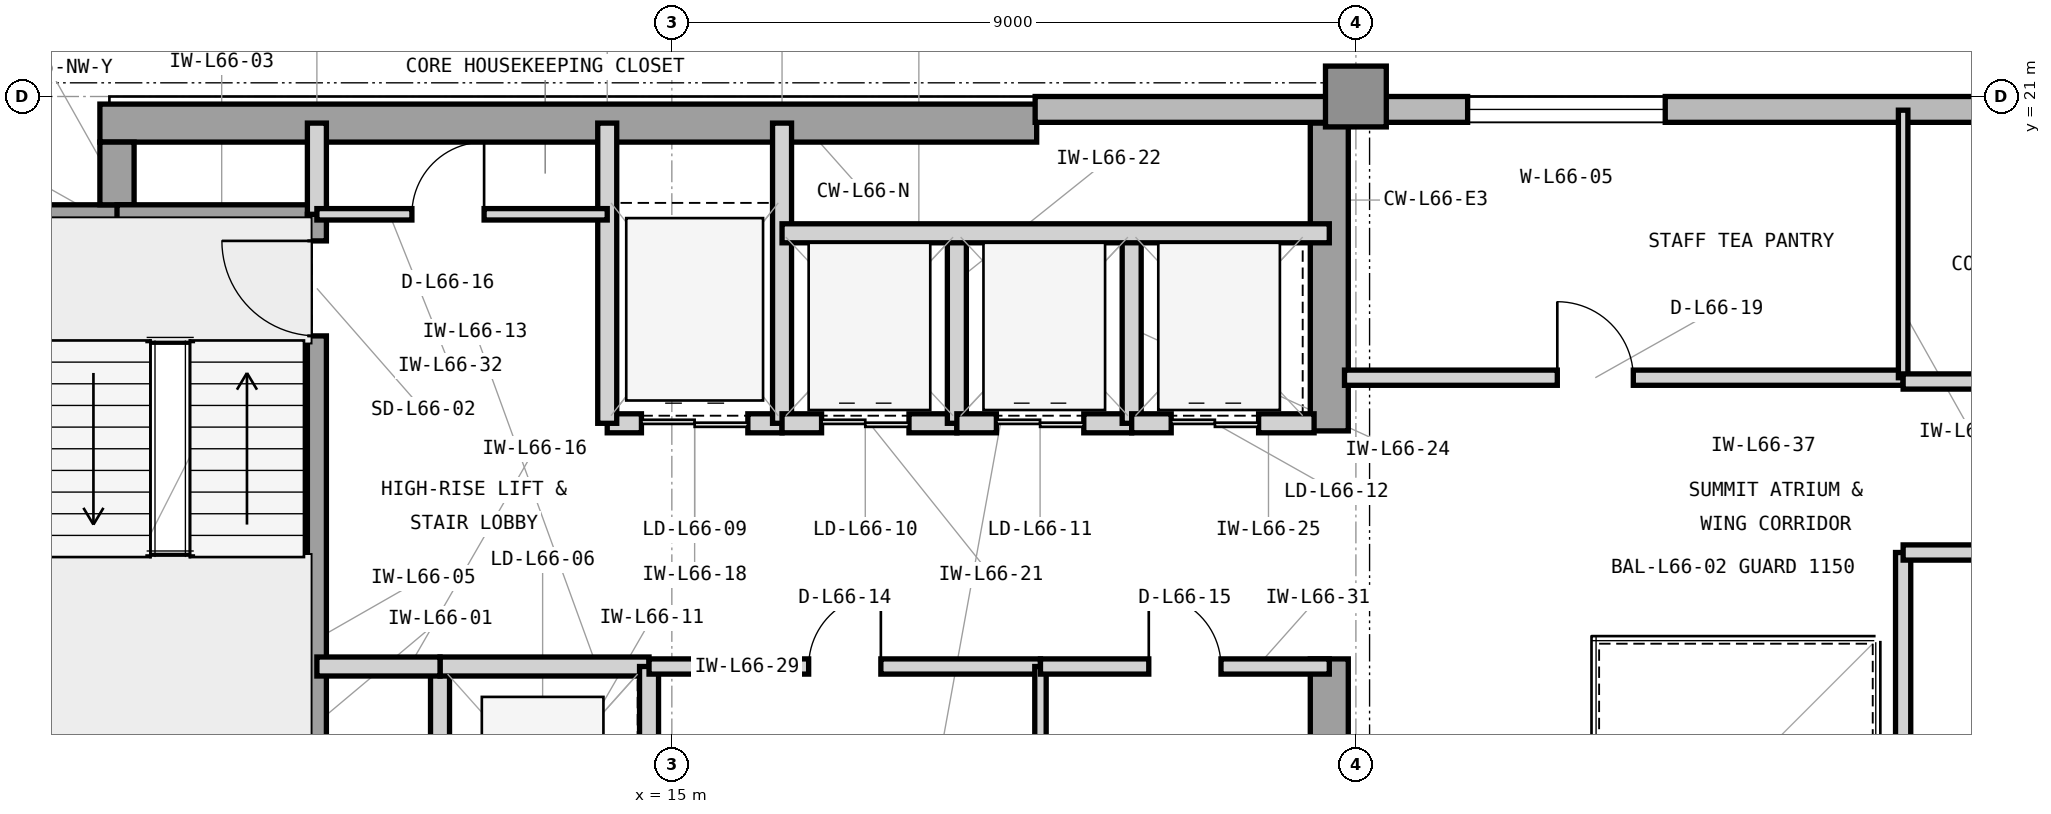
"""IFC4 building model, lengths in metres.
Left out: names, types, materials, properties, quantities, classifications, styles, units other than length and angle.
Written with IfcOpenShell. Run it as: python <this file> out.ifc"""

import sys

from ifc_helpers import new_model, si_unit, direction, frame, frame_2d, origin, origin_2d, place, context, subcontext, project, spatial, rectangle, extrude, element, fill, save


model = new_model("IFC4")
c1 = context("Model", 3, precision=1e-05, world=origin(), true_north=direction((0.0, 1.0)))
c2 = subcontext(c1, "Body", "Model", "MODEL_VIEW")
j1 = project(units=[si_unit("LENGTHUNIT", "METRE"), si_unit("PLANEANGLEUNIT", "RADIAN")], contexts=[c1])
p1 = place(None, origin())
s1 = spatial("IfcSite", under=j1, at=p1, CompositionType="ELEMENT")
p2 = place(p1, origin())
s2 = spatial("IfcBuilding", under=s1, at=p2, CompositionType="ELEMENT")
p3 = place(p2, frame((0.0, 0.0, 270.3)))
s3 = spatial("IfcBuildingStorey", under=s2, at=p3, CompositionType="ELEMENT", Elevation=270.3)
p4 = place(p3, frame((7.475, 20.65, 0.0), z_axis=(0.0, 0.0, 1.0), x_axis=(1.0, 0.0, 0.0)))
e1 = element("IfcWall", 1, at=p4, inside=s3, PredefinedType="SHEAR", context=c2, shape_type="SweptSolid", body=[
    extrude(rectangle(XDim=12.325, YDim=0.5, at=frame_2d((6.163, 0.0))), origin(), (0.0, 0.0, 1.0), 3.9),
])
p5 = place(p3, frame((23.65, 10.4, 0.0), z_axis=(0.0, 0.0, 1.0), x_axis=(0.0, 1.0, 0.0)))
e2 = element("IfcWall", 2, at=p5, inside=s3, PredefinedType="SHEAR", context=c2, shape_type="SweptSolid", body=[
    extrude(rectangle(XDim=3.2, YDim=0.5, at=frame_2d((1.6, 0.0))), origin(), (0.0, 0.0, 1.0), 3.9),
])
p6 = place(p3, frame((23.65, 16.6, 0.0), z_axis=(0.0, 0.0, 1.0), x_axis=(0.0, 1.0, 0.0)))
e3 = element("IfcWall", 3, at=p6, inside=s3, PredefinedType="SHEAR", context=c2, shape_type="SweptSolid", body=[
    extrude(rectangle(XDim=4.05, YDim=0.5, at=frame_2d((2.025, 0.0))), origin(), (0.0, 0.0, 1.0), 3.9),
])
p7 = place(p3, frame((6.6, 19.35, 0.0), z_axis=(0.0, 0.0, 1.0), x_axis=(1.0, 0.0, 0.0)))
e4 = element("IfcWall", 4, at=p7, inside=s3, PredefinedType="SHEAR", context=c2, shape_type="SweptSolid", body=[
    extrude(rectangle(XDim=1.325, YDim=0.45, at=frame_2d((0.663, 0.0))), origin(), (0.0, 0.0, 1.0), 3.9),
])
p8 = place(p3, frame((7.7, 19.575, 0.0), z_axis=(0.0, 0.0, 1.0), x_axis=(0.0, 1.0, 0.0)))
e5 = element("IfcWall", 5, at=p8, inside=s3, PredefinedType="SHEAR", context=c2, shape_type="SweptSolid", body=[
    extrude(rectangle(XDim=0.825, YDim=0.45, at=frame_2d((0.413, 0.0))), origin(), (0.0, 0.0, 1.0), 3.9),
])
p9 = place(p3, frame((24.0, 21.0, 0.0), z_axis=(0.0, 0.0, 1.0), x_axis=(1.0, 0.0, 0.0)))
e6 = element("IfcColumn", 6, at=p9, inside=s3, PredefinedType="COLUMN", context=c2, shape_type="SweptSolid", body=[
    extrude(rectangle(XDim=0.8, YDim=0.8, at=origin_2d()), origin(), (0.0, 0.0, 1.0), 3.9),
])
p10 = place(p3, frame((52.4, 20.83, 0.0), z_axis=(0.0, 0.0, 1.0), x_axis=(-1.0, 0.0, 0.0)))
e7 = element("IfcWall", 7, at=p10, inside=s3, PredefinedType="STANDARD", context=c2, shape_type="SweptSolid", body=[
    extrude(rectangle(XDim=32.62, YDim=0.34, at=frame_2d((16.31, 0.0))), origin(), (0.0, 0.0, 1.0), 3.715),
])
p11 = place(p10, frame((15.01, 0.0, 0.8)))
e8 = element("IfcOpeningElement", 8, at=p11, cuts=e7, PredefinedType="OPENING", context=c2, shape_type="SweptSolid", body=[
    extrude(rectangle(XDim=2.6, YDim=2.35, at=frame_2d((1.3, 1.175))), frame((0.0, 0.18, 0.0), z_axis=(0.0, -1.0, 0.0), x_axis=(1.0, 0.0, 0.0)), (0.0, 0.0, 1.0), 0.36),
])
p12 = place(p10, frame((24.33, 0.0, 0.8)))
e9 = element("IfcOpeningElement", 9, at=p12, cuts=e7, PredefinedType="OPENING", context=c2, shape_type="SweptSolid", body=[
    extrude(rectangle(XDim=2.6, YDim=2.35, at=frame_2d((1.3, 1.175))), frame((0.0, 0.18, 0.0), z_axis=(0.0, -1.0, 0.0), x_axis=(1.0, 0.0, 0.0)), (0.0, 0.0, 1.0), 0.36),
])
p13 = place(p10, frame((7.525, 0.0, 0.8)))
e10 = element("IfcOpeningElement", 10, at=p13, cuts=e7, PredefinedType="OPENING", context=c2, shape_type="SweptSolid", body=[
    extrude(rectangle(XDim=1.9, YDim=2.35, at=frame_2d((0.95, 1.175))), frame((0.0, 0.18, 0.0), z_axis=(0.0, -1.0, 0.0), x_axis=(1.0, 0.0, 0.0)), (0.0, 0.0, 1.0), 0.36),
])
p14 = place(p3, frame((7.7, 19.45, 0.0), z_axis=(0.0, 0.0, 1.0), x_axis=(1.0, 0.0, 0.0)))
e11 = element("IfcWall", 11, at=p14, inside=s3, PredefinedType="SHEAR", context=c2, shape_type="SweptSolid", body=[
    extrude(rectangle(XDim=2.755, YDim=0.25, at=frame_2d((1.377, 0.0))), origin(), (0.0, 0.0, 1.0), 3.9),
])
p15 = place(p3, frame((10.33, 12.0, 0.0), z_axis=(0.0, 0.0, 1.0), x_axis=(0.0, 1.0, 0.0)))
e12 = element("IfcWall", 12, at=p15, inside=s3, PredefinedType="SHEAR", context=c2, shape_type="SweptSolid", body=[
    extrude(rectangle(XDim=7.45, YDim=0.25, at=frame_2d((3.725, 0.0))), origin(), (0.0, 0.0, 1.0), 3.9),
])
p16 = place(p15, frame((5.85, 0.0, 0.0)))
e13 = element("IfcOpeningElement", 13, at=p16, cuts=e12, PredefinedType="OPENING", context=c2, shape_type="SweptSolid", body=[
    extrude(rectangle(XDim=1.25, YDim=2.2, at=frame_2d((0.625, 1.1))), frame((0.0, 0.135, 0.0), z_axis=(0.0, -1.0, 0.0), x_axis=(1.0, 0.0, 0.0)), (0.0, 0.0, 1.0), 0.27),
])
p17 = place(p3, frame((10.33, 19.45, 0.0), z_axis=(0.0, 0.0, 1.0), x_axis=(0.0, 1.0, 0.0)))
e14 = element("IfcWall", 14, at=p17, inside=s3, PredefinedType="PARTITIONING", context=c2, shape_type="SweptSolid", body=[
    extrude(rectangle(XDim=1.2, YDim=0.25, at=frame_2d((0.6, 0.0))), origin(), (0.0, 0.0, 1.0), 3.705),
])
p18 = place(p3, frame((11.95, 10.5, 0.0), z_axis=(0.0, 0.0, 1.0), x_axis=(0.0, 1.0, 0.0)))
e15 = element("IfcWall", 15, at=p18, inside=s3, PredefinedType="PARTITIONING", context=c2, shape_type="SweptSolid", body=[
    extrude(rectangle(XDim=3.0, YDim=0.25, at=frame_2d((1.5, 0.0))), origin(), (0.0, 0.0, 1.0), 3.705),
])
p19 = place(p3, frame((11.95, 13.5, 0.0), z_axis=(0.0, 0.0, 1.0), x_axis=(1.0, 0.0, 0.0)))
e16 = element("IfcWall", 16, at=p19, inside=s3, PredefinedType="PARTITIONING", context=c2, shape_type="SweptSolid", body=[
    extrude(rectangle(XDim=2.75, YDim=0.25, at=frame_2d((1.375, 0.0))), origin(), (0.0, 0.0, 1.0), 3.088),
])
p20 = place(p3, frame((14.7, 10.5, 0.0), z_axis=(0.0, 0.0, 1.0), x_axis=(0.0, 1.0, 0.0)))
e17 = element("IfcWall", 17, at=p20, inside=s3, PredefinedType="PARTITIONING", context=c2, shape_type="SweptSolid", body=[
    extrude(rectangle(XDim=3.0, YDim=0.25, at=frame_2d((1.5, 0.0))), origin(), (0.0, 0.0, 1.0), 3.705),
])
p21 = place(p3, frame((10.33, 13.5, 0.0), z_axis=(0.0, 0.0, 1.0), x_axis=(1.0, 0.0, 0.0)))
e18 = element("IfcWall", 18, at=p21, inside=s3, PredefinedType="PARTITIONING", context=c2, shape_type="SweptSolid", body=[
    extrude(rectangle(XDim=1.62, YDim=0.25, at=frame_2d((0.81, 0.0))), origin(), (0.0, 0.0, 1.0), 3.088),
])
p22 = place(p3, frame((14.15, 16.7, 0.0), z_axis=(0.0, 0.0, 1.0), x_axis=(1.0, 0.0, 0.0)))
e19 = element("IfcWall", 19, at=p22, inside=s3, PredefinedType="PARTITIONING", context=c2, shape_type="SweptSolid", body=[
    extrude(rectangle(XDim=2.3, YDim=0.25, at=frame_2d((1.15, 0.0))), origin(), (0.0, 0.0, 1.0), 3.088),
])
p23 = place(p22, frame((0.45, 0.0, 0.0)))
e20 = element("IfcOpeningElement", 20, at=p23, cuts=e19, PredefinedType="OPENING", context=c2, shape_type="SweptSolid", body=[
    extrude(rectangle(XDim=1.4, YDim=2.35, at=frame_2d((0.7, 1.175))), frame((0.0, 0.135, 0.0), z_axis=(0.0, -1.0, 0.0), x_axis=(1.0, 0.0, 0.0)), (0.0, 0.0, 1.0), 0.27),
])
for number, where, z_axis, x_axis in (
    (21, (14.15, 16.7, 0.0), (0.0, 0.0, 1.0), (0.0, 1.0, 0.0)),
    (22, (16.45, 16.7, 0.0), (0.0, 0.0, 1.0), (0.0, 1.0, 0.0)),
):
    element("IfcWall", number, at=place(p3, frame(where, z_axis=z_axis, x_axis=x_axis)), inside=s3, PredefinedType="PARTITIONING", context=c2, shape_type="SweptSolid", body=[
        extrude(rectangle(XDim=3.95, YDim=0.25, at=frame_2d((1.975, 0.0))), origin(), (0.0, 0.0, 1.0), 3.705),
    ])
p24 = place(p3, frame((16.45, 16.7, 0.0), z_axis=(0.0, 0.0, 1.0), x_axis=(1.0, 0.0, 0.0)))
e23 = element("IfcWall", 23, at=p24, inside=s3, PredefinedType="PARTITIONING", context=c2, shape_type="SweptSolid", body=[
    extrude(rectangle(XDim=2.3, YDim=0.25, at=frame_2d((1.15, 0.0))), origin(), (0.0, 0.0, 1.0), 3.088),
])
p25 = place(p24, frame((0.52, 0.0, 0.0)))
e24 = element("IfcOpeningElement", 24, at=p25, cuts=e23, PredefinedType="OPENING", context=c2, shape_type="SweptSolid", body=[
    extrude(rectangle(XDim=1.15, YDim=2.25, at=frame_2d((0.575, 1.125))), frame((0.0, 0.135, 0.0), z_axis=(0.0, -1.0, 0.0), x_axis=(1.0, 0.0, 0.0)), (0.0, 0.0, 1.0), 0.27),
])
p26 = place(p3, frame((18.75, 16.7, 0.0), z_axis=(0.0, 0.0, 1.0), x_axis=(0.0, 1.0, 0.0)))
e25 = element("IfcWall", 25, at=p26, inside=s3, PredefinedType="PARTITIONING", context=c2, shape_type="SweptSolid", body=[
    extrude(rectangle(XDim=2.5, YDim=0.25, at=frame_2d((1.25, 0.0))), origin(), (0.0, 0.0, 1.0), 3.705),
])
p27 = place(p3, frame((18.75, 16.7, 0.0), z_axis=(0.0, 0.0, 1.0), x_axis=(1.0, 0.0, 0.0)))
e26 = element("IfcWall", 26, at=p27, inside=s3, PredefinedType="PARTITIONING", context=c2, shape_type="SweptSolid", body=[
    extrude(rectangle(XDim=2.3, YDim=0.25, at=frame_2d((1.15, 0.0))), origin(), (0.0, 0.0, 1.0), 3.088),
])
p28 = place(p27, frame((0.52, 0.0, 0.0)))
e27 = element("IfcOpeningElement", 27, at=p28, cuts=e26, PredefinedType="OPENING", context=c2, shape_type="SweptSolid", body=[
    extrude(rectangle(XDim=1.15, YDim=2.25, at=frame_2d((0.575, 1.125))), frame((0.0, 0.135, 0.0), z_axis=(0.0, -1.0, 0.0), x_axis=(1.0, 0.0, 0.0)), (0.0, 0.0, 1.0), 0.27),
])
p29 = place(p3, frame((21.05, 16.7, 0.0), z_axis=(0.0, 0.0, 1.0), x_axis=(0.0, 1.0, 0.0)))
e28 = element("IfcWall", 28, at=p29, inside=s3, PredefinedType="PARTITIONING", context=c2, shape_type="SweptSolid", body=[
    extrude(rectangle(XDim=2.5, YDim=0.25, at=frame_2d((1.25, 0.0))), origin(), (0.0, 0.0, 1.0), 3.705),
])
p30 = place(p3, frame((21.05, 16.7, 0.0), z_axis=(0.0, 0.0, 1.0), x_axis=(1.0, 0.0, 0.0)))
e29 = element("IfcWall", 29, at=p30, inside=s3, PredefinedType="PARTITIONING", context=c2, shape_type="SweptSolid", body=[
    extrude(rectangle(XDim=2.4, YDim=0.25, at=frame_2d((1.2, 0.0))), origin(), (0.0, 0.0, 1.0), 3.088),
])
p31 = place(p30, frame((0.52, 0.0, 0.0)))
e30 = element("IfcOpeningElement", 30, at=p31, cuts=e29, PredefinedType="OPENING", context=c2, shape_type="SweptSolid", body=[
    extrude(rectangle(XDim=1.15, YDim=2.25, at=frame_2d((0.575, 1.125))), frame((0.0, 0.135, 0.0), z_axis=(0.0, -1.0, 0.0), x_axis=(1.0, 0.0, 0.0)), (0.0, 0.0, 1.0), 0.27),
])
p32 = place(p3, frame((16.45, 19.2, 0.0), z_axis=(0.0, 0.0, 1.0), x_axis=(1.0, 0.0, 0.0)))
e31 = element("IfcWall", 31, at=p32, inside=s3, PredefinedType="PARTITIONING", context=c2, shape_type="SweptSolid", body=[
    extrude(rectangle(XDim=7.2, YDim=0.25, at=frame_2d((3.6, 0.0))), origin(), (0.0, 0.0, 1.0), 3.705),
])
p33 = place(p3, frame((14.7, 13.5, 0.0), z_axis=(0.0, 0.0, 1.0), x_axis=(1.0, 0.0, 0.0)))
e32 = element("IfcWall", 32, at=p33, inside=s3, PredefinedType="PARTITIONING", context=c2, shape_type="SweptSolid", body=[
    extrude(rectangle(XDim=5.15, YDim=0.2, at=frame_2d((2.575, 0.0))), origin(), (0.0, 0.0, 1.0), 3.088),
])
p34 = place(p33, frame((2.1, 0.0, 0.0)))
e33 = element("IfcOpeningElement", 33, at=p34, cuts=e32, PredefinedType="OPENING", context=c2, shape_type="SweptSolid", body=[
    extrude(rectangle(XDim=0.95, YDim=2.1, at=frame_2d((0.475, 1.05))), frame((0.0, 0.11, 0.0), z_axis=(0.0, -1.0, 0.0), x_axis=(1.0, 0.0, 0.0)), (0.0, 0.0, 1.0), 0.22),
])
p35 = place(p3, frame((19.85, 10.465, 0.0), z_axis=(0.0, 0.0, 1.0), x_axis=(0.0, 1.0, 0.0)))
e34 = element("IfcWall", 34, at=p35, inside=s3, PredefinedType="PARTITIONING", context=c2, shape_type="SweptSolid", body=[
    extrude(rectangle(XDim=3.035, YDim=0.15, at=frame_2d((1.518, 0.0))), origin(), (0.0, 0.0, 1.0), 3.705),
])
p36 = place(p3, frame((19.85, 13.5, 0.0), z_axis=(0.0, 0.0, 1.0), x_axis=(1.0, 0.0, 0.0)))
e35 = element("IfcWall", 35, at=p36, inside=s3, PredefinedType="PARTITIONING", context=c2, shape_type="SweptSolid", body=[
    extrude(rectangle(XDim=3.8, YDim=0.2, at=frame_2d((1.9, 0.0))), origin(), (0.0, 0.0, 1.0), 3.088),
])
p37 = place(p36, frame((1.425, 0.0, 0.0)))
e36 = element("IfcOpeningElement", 36, at=p37, cuts=e35, PredefinedType="OPENING", context=c2, shape_type="SweptSolid", body=[
    extrude(rectangle(XDim=0.95, YDim=2.1, at=frame_2d((0.475, 1.05))), frame((0.0, 0.11, 0.0), z_axis=(0.0, -1.0, 0.0), x_axis=(1.0, 0.0, 0.0)), (0.0, 0.0, 1.0), 0.22),
])
p38 = place(p3, frame((10.33, 19.45, 0.0), z_axis=(0.0, 0.0, 1.0), x_axis=(1.0, 0.0, 0.0)))
e37 = element("IfcWall", 37, at=p38, inside=s3, PredefinedType="PARTITIONING", context=c2, shape_type="SweptSolid", body=[
    extrude(rectangle(XDim=3.82, YDim=0.15, at=frame_2d((1.91, 0.0))), origin(), (0.0, 0.0, 1.0), 3.705),
])
p39 = place(p38, frame((1.25, 0.0, 0.0)))
e38 = element("IfcOpeningElement", 38, at=p39, cuts=e37, PredefinedType="OPENING", context=c2, shape_type="SweptSolid", body=[
    extrude(rectangle(XDim=0.95, YDim=2.1, at=frame_2d((0.475, 1.05))), frame((0.0, 0.085, 0.0), z_axis=(0.0, -1.0, 0.0), x_axis=(1.0, 0.0, 0.0)), (0.0, 0.0, 1.0), 0.17),
])
p40 = place(p3, frame((31.2, 3.18, 0.0), z_axis=(0.0, 0.0, 1.0), x_axis=(0.0, 1.0, 0.0)))
e39 = element("IfcWall", 39, at=p40, inside=s3, PredefinedType="PARTITIONING", context=c2, shape_type="SweptSolid", body=[
    extrude(rectangle(XDim=11.82, YDim=0.2, at=frame_2d((5.91, 0.0))), origin(), (0.0, 0.0, 1.0), 3.705),
])
p41 = place(p3, frame((23.85, 17.3, 0.0), z_axis=(0.0, 0.0, 1.0), x_axis=(1.0, 0.0, 0.0)))
e40 = element("IfcWall", 40, at=p41, inside=s3, PredefinedType="PARTITIONING", context=c2, shape_type="SweptSolid", body=[
    extrude(rectangle(XDim=7.35, YDim=0.2, at=frame_2d((3.675, 0.0))), origin(), (0.0, 0.0, 1.0), 3.705),
])
p42 = place(p41, frame((2.8, 0.0, 0.0)))
e41 = element("IfcOpeningElement", 41, at=p42, cuts=e40, PredefinedType="OPENING", context=c2, shape_type="SweptSolid", body=[
    extrude(rectangle(XDim=1.0, YDim=2.15, at=frame_2d((0.5, 1.075))), frame((0.0, 0.11, 0.0), z_axis=(0.0, -1.0, 0.0), x_axis=(1.0, 0.0, 0.0)), (0.0, 0.0, 1.0), 0.22),
])
p43 = place(p3, frame((31.2, 17.3, 0.0), z_axis=(0.0, 0.0, 1.0), x_axis=(0.0, 1.0, 0.0)))
e42 = element("IfcWall", 42, at=p43, inside=s3, PredefinedType="PARTITIONING", context=c2, shape_type="SweptSolid", body=[
    extrude(rectangle(XDim=3.52, YDim=0.125, at=frame_2d((1.76, 0.0))), origin(), (0.0, 0.0, 1.0), 3.705),
])
p44 = place(p3, frame((31.2, 15.0, 0.0), z_axis=(0.0, 0.0, 1.0), x_axis=(1.0, 0.0, 0.0)))
e43 = element("IfcWall", 43, at=p44, inside=s3, PredefinedType="PARTITIONING", context=c2, shape_type="SweptSolid", body=[
    extrude(rectangle(XDim=6.5, YDim=0.2, at=frame_2d((3.25, 0.0))), origin(), (0.0, 0.0, 1.0), 3.301),
])
p45 = place(p44, frame((2.5, 0.0, 0.0)))
e44 = element("IfcOpeningElement", 44, at=p45, cuts=e43, PredefinedType="OPENING", context=c2, shape_type="SweptSolid", body=[
    extrude(rectangle(XDim=1.5, YDim=2.3, at=frame_2d((0.75, 1.15))), frame((0.0, 0.11, 0.0), z_axis=(0.0, -1.0, 0.0), x_axis=(1.0, 0.0, 0.0)), (0.0, 0.0, 1.0), 0.22),
])
p46 = place(p3, frame((31.2, 17.25, 0.0), z_axis=(0.0, 0.0, 1.0), x_axis=(1.0, 0.0, 0.0)))
e45 = element("IfcWall", 45, at=p46, inside=s3, PredefinedType="PARTITIONING", context=c2, shape_type="SweptSolid", body=[
    extrude(rectangle(XDim=9.0, YDim=0.2, at=frame_2d((4.5, 0.0))), origin(), (0.0, 0.0, 1.0), 3.705),
])
p47 = place(p46, frame((3.75, 0.0, 0.0)))
e46 = element("IfcOpeningElement", 46, at=p47, cuts=e45, PredefinedType="OPENING", context=c2, shape_type="SweptSolid", body=[
    extrude(rectangle(XDim=1.5, YDim=2.3, at=frame_2d((0.75, 1.15))), frame((0.0, 0.11, 0.0), z_axis=(0.0, -1.0, 0.0), x_axis=(1.0, 0.0, 0.0)), (0.0, 0.0, 1.0), 0.22),
])
p48 = place(p12, origin())
e47 = element("IfcWindow", 47, at=p48, inside=s3, PartitioningType="SINGLE_PANEL", PredefinedType="WINDOW", context=c2, shape_type="SweptSolid", body=[
    extrude(rectangle(XDim=2.6, YDim=2.35, at=frame_2d((1.3, 1.175))), frame((0.0, 0.11, 0.0), z_axis=(0.0, -1.0, 0.0), x_axis=(1.0, 0.0, 0.0)), (0.0, 0.0, 1.0), 0.06),
])
fill(e9, e47)
p49 = place(p16, origin())
e48 = element("IfcDoor", 48, at=p49, inside=s3, OperationType="SINGLE_SWING_RIGHT", PredefinedType="DOOR", context=c2, shape_type="SweptSolid", body=[
    extrude(rectangle(XDim=1.25, YDim=2.2, at=frame_2d((0.625, 1.1))), frame((0.0, 0.025, 0.0), z_axis=(0.0, -1.0, 0.0), x_axis=(1.0, 0.0, 0.0)), (0.0, 0.0, 1.0), 0.05),
])
fill(e13, e48)
p50 = place(p23, origin())
e49 = element("IfcDoor", 49, at=p50, inside=s3, OperationType="DOUBLE_DOOR_SLIDING", PredefinedType="DOOR", context=c2, shape_type="SweptSolid", body=[
    extrude(rectangle(XDim=1.4, YDim=2.35, at=frame_2d((0.7, 1.175))), frame((0.0, 0.025, 0.0), z_axis=(0.0, -1.0, 0.0), x_axis=(1.0, 0.0, 0.0)), (0.0, 0.0, 1.0), 0.05),
])
fill(e20, e49)
p51 = place(p25, origin())
e50 = element("IfcDoor", 50, at=p51, inside=s3, OperationType="DOUBLE_DOOR_SLIDING", PredefinedType="DOOR", context=c2, shape_type="SweptSolid", body=[
    extrude(rectangle(XDim=1.15, YDim=2.25, at=frame_2d((0.575, 1.125))), frame((0.0, 0.025, 0.0), z_axis=(0.0, -1.0, 0.0), x_axis=(1.0, 0.0, 0.0)), (0.0, 0.0, 1.0), 0.05),
])
fill(e24, e50)
p52 = place(p28, origin())
e51 = element("IfcDoor", 51, at=p52, inside=s3, OperationType="DOUBLE_DOOR_SLIDING", PredefinedType="DOOR", context=c2, shape_type="SweptSolid", body=[
    extrude(rectangle(XDim=1.15, YDim=2.25, at=frame_2d((0.575, 1.125))), frame((0.0, 0.025, 0.0), z_axis=(0.0, -1.0, 0.0), x_axis=(1.0, 0.0, 0.0)), (0.0, 0.0, 1.0), 0.05),
])
fill(e27, e51)
p53 = place(p31, origin())
e52 = element("IfcDoor", 52, at=p53, inside=s3, OperationType="DOUBLE_DOOR_SLIDING", PredefinedType="DOOR", context=c2, shape_type="SweptSolid", body=[
    extrude(rectangle(XDim=1.15, YDim=2.25, at=frame_2d((0.575, 1.125))), frame((0.0, 0.025, 0.0), z_axis=(0.0, -1.0, 0.0), x_axis=(1.0, 0.0, 0.0)), (0.0, 0.0, 1.0), 0.05),
])
fill(e30, e52)
p54 = place(p34, origin())
e53 = element("IfcDoor", 53, at=p54, inside=s3, OperationType="SINGLE_SWING_RIGHT", PredefinedType="DOOR", context=c2, shape_type="SweptSolid", body=[
    extrude(rectangle(XDim=0.95, YDim=2.1, at=frame_2d((0.475, 1.05))), frame((0.0, 0.025, 0.0), z_axis=(0.0, -1.0, 0.0), x_axis=(1.0, 0.0, 0.0)), (0.0, 0.0, 1.0), 0.05),
])
fill(e33, e53)
p55 = place(p37, origin())
e54 = element("IfcDoor", 54, at=p55, inside=s3, OperationType="SINGLE_SWING_LEFT", PredefinedType="DOOR", context=c2, shape_type="SweptSolid", body=[
    extrude(rectangle(XDim=0.95, YDim=2.1, at=frame_2d((0.475, 1.05))), frame((0.0, 0.025, 0.0), z_axis=(0.0, -1.0, 0.0), x_axis=(1.0, 0.0, 0.0)), (0.0, 0.0, 1.0), 0.05),
])
fill(e36, e54)
p56 = place(p39, origin())
e55 = element("IfcDoor", 55, at=p56, inside=s3, OperationType="SINGLE_SWING_RIGHT", PredefinedType="DOOR", context=c2, shape_type="SweptSolid", body=[
    extrude(rectangle(XDim=0.95, YDim=2.1, at=frame_2d((0.475, 1.05))), frame((0.0, 0.025, 0.0), z_axis=(0.0, -1.0, 0.0), x_axis=(1.0, 0.0, 0.0)), (0.0, 0.0, 1.0), 0.05),
])
fill(e38, e55)
p57 = place(p42, origin())
e56 = element("IfcDoor", 56, at=p57, inside=s3, OperationType="SINGLE_SWING_LEFT", PredefinedType="DOOR", context=c2, shape_type="SweptSolid", body=[
    extrude(rectangle(XDim=1.0, YDim=2.15, at=frame_2d((0.5, 1.075))), frame((0.0, 0.025, 0.0), z_axis=(0.0, -1.0, 0.0), x_axis=(1.0, 0.0, 0.0)), (0.0, 0.0, 1.0), 0.05),
])
fill(e41, e56)
save(model, sys.argv[1])
